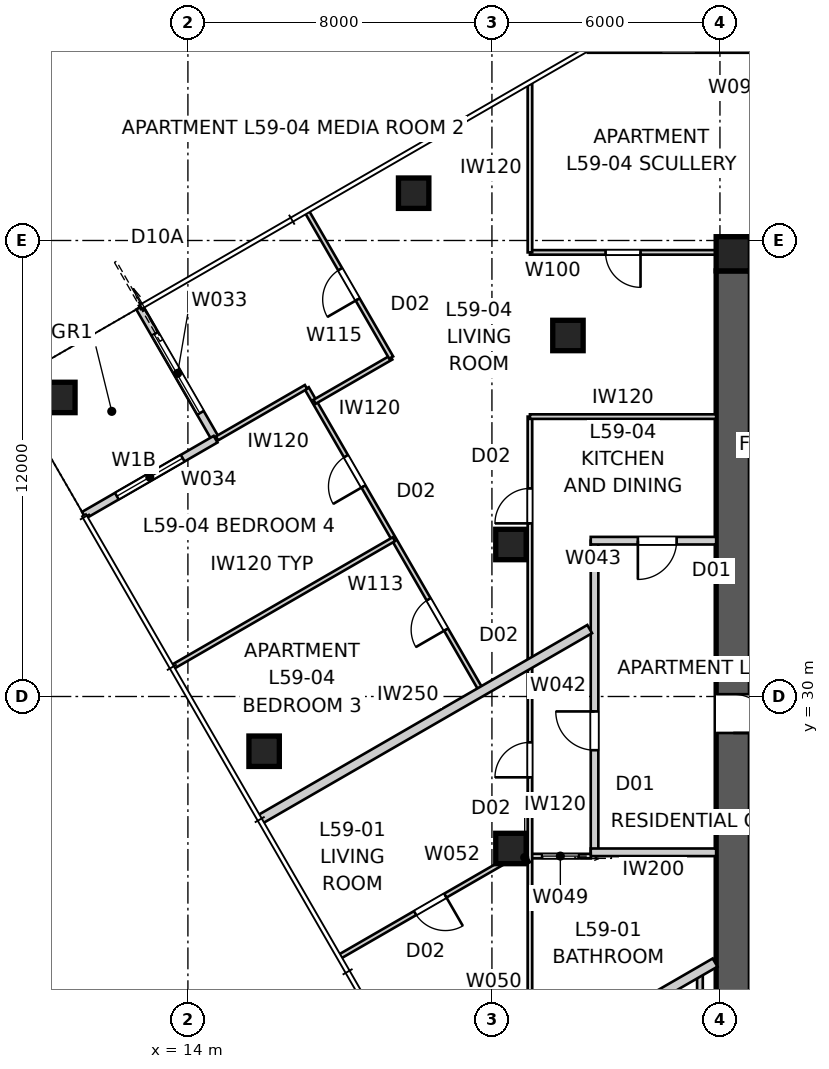
"""IFC4 building model, lengths in metres.
Left out: names, types, materials, properties, quantities, classifications, styles, units other than length and angle.
Written with IfcOpenShell. Run it as: python <this file> out.ifc"""

import sys

from ifc_helpers import new_model, si_unit, direction, frame, frame_2d, origin, origin_2d, place, context, subcontext, project, spatial, polyline, rectangle, outline, extrude, element, fill, save


model = new_model("IFC4")
c1 = context("Model", 3, precision=1e-05, world=origin(), true_north=direction((0.0, 1.0)))
c2 = subcontext(c1, "Body", "Model", "MODEL_VIEW")
j1 = project(units=[si_unit("LENGTHUNIT", "METRE"), si_unit("PLANEANGLEUNIT", "RADIAN")], contexts=[c1])
p1 = place(None, origin())
s1 = spatial("IfcSite", under=j1, at=p1, CompositionType="ELEMENT")
p2 = place(p1, origin())
s2 = spatial("IfcBuilding", under=s1, at=p2, CompositionType="ELEMENT")
p3 = place(p2, frame((0.0, 0.0, 215.0)))
s3 = spatial("IfcBuildingStorey", under=s2, at=p3, CompositionType="ELEMENT", Elevation=215.0)
p4 = place(p3, frame((28.8, 41.65, 0.0), z_axis=(0.0, 0.0, 1.0), x_axis=(1.0, 0.0, 0.0)))
e1 = element("IfcWall", 1, at=p4, inside=s3, PredefinedType="SHEAR", context=c2, shape_type="SweptSolid", body=[
    extrude(outline(polyline([(0.0, -0.45), (22.4, -0.45), (22.4, -0.025), (22.85, -0.025), (22.85, 0.025), (22.4, 0.025), (22.4, 0.45), (0.0, 0.45), (0.0, 0.025), (-0.45, 0.025), (-0.45, -0.025), (0.0, -0.025), (0.0, -0.45)])), origin(), (0.0, 0.0, 1.0), 3.4),
])
p5 = place(p3, frame((28.35, 41.2, 0.0), z_axis=(0.0, 0.0, 1.0), x_axis=(0.0, -1.0, 0.0)))
e2 = element("IfcWall", 2, at=p5, inside=s3, PredefinedType="SHEAR", context=c2, shape_type="SweptSolid", body=[
    extrude(outline(polyline([(0.0, -0.45), (22.4, -0.45), (22.4, -0.025), (22.85, -0.025), (22.85, 0.025), (22.4, 0.025), (22.4, 0.45), (0.0, 0.45), (0.0, 0.025), (-0.45, 0.025), (-0.45, -0.025), (0.0, -0.025), (0.0, -0.45)])), origin(), (0.0, 0.0, 1.0), 3.4),
])
p6 = place(p5, frame((11.14, 0.0, 0.0)))
e3 = element("IfcOpeningElement", 3, at=p6, cuts=e2, PredefinedType="OPENING", context=c2, shape_type="SweptSolid", body=[
    extrude(rectangle(XDim=1.02, YDim=2.4, at=frame_2d((0.51, 1.2))), frame((0.0, 0.46, 0.0), z_axis=(0.0, -1.0, 0.0), x_axis=(1.0, 0.0, 0.0)), (0.0, 0.0, 1.0), 0.92),
])
p7 = place(p3, frame((28.35, 41.65, 0.0), z_axis=(0.0, 0.0, 1.0), x_axis=(1.0, 0.0, 0.0)))
e4 = element("IfcColumn", 4, at=p7, inside=s3, PredefinedType="COLUMN", context=c2, shape_type="SweptSolid", body=[
    extrude(rectangle(XDim=0.9, YDim=0.9, at=origin_2d()), origin(), (0.0, 0.0, 1.0), 3.4),
])
for number, where, z_axis, x_axis in (
    (5, (19.94, 43.245, 0.0), (0.0, 0.0, 1.0), (1.0, 0.0, 0.0)),
    (6, (10.63, 37.87, 0.0), (0.0, 0.0, 1.0), (1.0, 0.0, 0.0)),
    (7, (16.005, 28.56, 0.0), (0.0, 0.0, 1.0), (1.0, 0.0, 0.0)),
    (8, (24.0, 39.5, 0.0), (0.0, 0.0, 1.0), (1.0, 0.0, 0.0)),
    (9, (22.5, 34.0, 0.0), (0.0, 0.0, 1.0), (1.0, 0.0, 0.0)),
    (10, (22.5, 26.0, 0.0), (0.0, 0.0, 1.0), (1.0, 0.0, 0.0)),
):
    element("IfcColumn", number, at=place(p3, frame(where, z_axis=z_axis, x_axis=x_axis)), inside=s3, PredefinedType="COLUMN", context=c2, shape_type="SweptSolid", body=[
        extrude(rectangle(XDim=0.8, YDim=0.8, at=origin_2d()), origin(), (0.0, 0.0, 1.0), 3.4),
    ])
p8 = place(p3, frame((12.729, 40.236, 0.0), z_axis=(0.0, 0.0, 1.0), x_axis=(0.49999894854, -0.866026010844, 0.0)))
e11 = element("IfcWall", 11, at=p8, inside=s3, PredefinedType="SOLIDWALL", context=c2, shape_type="SweptSolid", body=[
    extrude(rectangle(XDim=4.0, YDim=0.2, at=frame_2d((2.0, 0.0))), origin(), (0.0, 0.0, 1.0), 3.25),
])
p9 = place(p8, frame((0.8, 0.0, 0.0)))
e12 = element("IfcOpeningElement", 12, at=p9, cuts=e11, PredefinedType="OPENING", context=c2, shape_type="SweptSolid", body=[
    extrude(rectangle(XDim=2.4, YDim=2.1, at=frame_2d((1.2, 1.05))), frame((0.0, 0.11, 0.0), z_axis=(0.0, -1.0, 0.0), x_axis=(1.0, 0.0, 0.0)), (0.0, 0.0, 1.0), 0.22),
])
p10 = place(p3, frame((14.729, 36.771, 0.0), z_axis=(0.0, 0.0, 1.0), x_axis=(-0.866026010844, -0.49999894854, 0.0)))
e13 = element("IfcWall", 13, at=p10, inside=s3, PredefinedType="SOLIDWALL", context=c2, shape_type="SweptSolid", body=[
    extrude(rectangle(XDim=4.0, YDim=0.2, at=frame_2d((2.0, 0.0))), origin(), (0.0, 0.0, 1.0), 3.25),
])
p11 = place(p10, frame((1.0, 0.0, 0.45)))
e14 = element("IfcOpeningElement", 14, at=p11, cuts=e13, PredefinedType="OPENING", context=c2, shape_type="SweptSolid", body=[
    extrude(rectangle(XDim=2.0, YDim=1.8, at=frame_2d((1.0, 0.9))), frame((0.0, 0.11, 0.0), z_axis=(0.0, -1.0, 0.0), x_axis=(1.0, 0.0, 0.0)), (0.0, 0.0, 1.0), 0.22),
])
p12 = place(p3, frame((24.7, 25.9, 0.0), z_axis=(0.0, 0.0, 1.0), x_axis=(0.0, 1.0, 0.0)))
e15 = element("IfcWall", 15, at=p12, inside=s3, PredefinedType="PARTITIONING", context=c2, shape_type="SweptSolid", body=[
    extrude(rectangle(XDim=8.2, YDim=0.2, at=frame_2d((4.1, 0.0))), origin(), (0.0, 0.0, 1.0), 3.25),
])
p13 = place(p12, frame((2.687, 0.0, 0.0)))
e16 = element("IfcOpeningElement", 16, at=p13, cuts=e15, PredefinedType="OPENING", context=c2, shape_type="SweptSolid", body=[
    extrude(rectangle(XDim=1.02, YDim=2.34, at=frame_2d((0.51, 1.17))), frame((0.0, 0.11, 0.0), z_axis=(0.0, -1.0, 0.0), x_axis=(1.0, 0.0, 0.0)), (0.0, 0.0, 1.0), 0.22),
])
p14 = place(p3, frame((27.9, 34.1, 0.0), z_axis=(0.0, 0.0, 1.0), x_axis=(-1.0, 0.0, 0.0)))
e17 = element("IfcWall", 17, at=p14, inside=s3, PredefinedType="PARTITIONING", context=c2, shape_type="SweptSolid", body=[
    extrude(rectangle(XDim=3.3, YDim=0.2, at=frame_2d((1.65, 0.0))), origin(), (0.0, 0.0, 1.0), 3.25),
])
p15 = place(p14, frame((1.04, 0.0, 0.0)))
e18 = element("IfcOpeningElement", 18, at=p15, cuts=e17, PredefinedType="OPENING", context=c2, shape_type="SweptSolid", body=[
    extrude(rectangle(XDim=1.02, YDim=2.34, at=frame_2d((0.51, 1.17))), frame((0.0, 0.11, 0.0), z_axis=(0.0, -1.0, 0.0), x_axis=(1.0, 0.0, 0.0)), (0.0, 0.0, 1.0), 0.22),
])
p16 = place(p3, frame((27.9, 25.9, 0.0), z_axis=(0.0, 0.0, 1.0), x_axis=(-1.0, 0.0, 0.0)))
e19 = element("IfcWall", 19, at=p16, inside=s3, PredefinedType="PARTITIONING", context=c2, shape_type="SweptSolid", body=[
    extrude(rectangle(XDim=3.3, YDim=0.2, at=frame_2d((1.65, 0.0))), origin(), (0.0, 0.0, 1.0), 3.25),
])
p17 = place(p3, frame((20.514, 18.75, 0.0), z_axis=(0.0, 0.0, 1.0), x_axis=(0.866020489494, 0.500008511703, 0.0)))
e20 = element("IfcWall", 20, at=p17, inside=s3, PredefinedType="PARTITIONING", context=c2, shape_type="SweptSolid", body=[
    extrude(rectangle(XDim=8.496, YDim=0.25, at=frame_2d((4.248, 0.0))), origin(), (0.0, 0.0, 1.0), 3.25),
])
p18 = place(p3, frame((15.889, 26.761, 0.0), z_axis=(0.0, 0.0, 1.0), x_axis=(0.866024190901, 0.50000210077, 0.0)))
e21 = element("IfcWall", 21, at=p18, inside=s3, PredefinedType="PARTITIONING", context=c2, shape_type="SweptSolid", body=[
    extrude(rectangle(XDim=10.026, YDim=0.25, at=frame_2d((5.013, 0.0))), origin(), (0.0, 0.0, 1.0), 3.25),
])
p19 = place(p3, frame((24.6, 25.8, 0.0), z_axis=(0.0, 0.0, 1.0), x_axis=(-1.0, 0.0, 0.0)))
e22 = element("IfcWall", 22, at=p19, inside=s3, PredefinedType="PARTITIONING", context=c2, shape_type="SweptSolid", body=[
    extrude(rectangle(XDim=1.6, YDim=0.12, at=frame_2d((0.8, 0.0))), origin(), (0.0, 0.0, 1.0), 3.25),
])
p20 = place(p19, frame((0.32, 0.0, 0.0)))
e23 = element("IfcOpeningElement", 23, at=p20, cuts=e22, PredefinedType="OPENING", context=c2, shape_type="SweptSolid", body=[
    extrude(rectangle(XDim=0.96, YDim=2.1, at=frame_2d((0.48, 1.05))), frame((0.0, 0.07, 0.0), z_axis=(0.0, -1.0, 0.0), x_axis=(1.0, 0.0, 0.0)), (0.0, 0.0, 1.0), 0.14),
])
p21 = place(p3, frame((23.0, 20.185, 0.0), z_axis=(0.0, 0.0, 1.0), x_axis=(0.0, 1.0, 0.0)))
e24 = element("IfcWall", 24, at=p21, inside=s3, PredefinedType="PARTITIONING", context=c2, shape_type="SweptSolid", body=[
    extrude(rectangle(XDim=17.18, YDim=0.12, at=frame_2d((8.59, 0.0))), origin(), (0.0, 0.0, 1.0), 2.55),
])
p22 = place(p21, frame((7.688, 0.0, 0.0)))
e25 = element("IfcOpeningElement", 25, at=p22, cuts=e24, PredefinedType="OPENING", context=c2, shape_type="SweptSolid", body=[
    extrude(rectangle(XDim=0.92, YDim=2.34, at=frame_2d((0.46, 1.17))), frame((0.0, 0.07, 0.0), z_axis=(0.0, -1.0, 0.0), x_axis=(1.0, 0.0, 0.0)), (0.0, 0.0, 1.0), 0.14),
])
p23 = place(p21, frame((14.371, 0.0, 0.0)))
e26 = element("IfcOpeningElement", 26, at=p23, cuts=e24, PredefinedType="OPENING", context=c2, shape_type="SweptSolid", body=[
    extrude(rectangle(XDim=0.92, YDim=2.34, at=frame_2d((0.46, 1.17))), frame((0.0, 0.07, 0.0), z_axis=(0.0, -1.0, 0.0), x_axis=(1.0, 0.0, 0.0)), (0.0, 0.0, 1.0), 0.14),
])
p24 = place(p3, frame((22.95, 25.612, 0.0), z_axis=(0.0, 0.0, 1.0), x_axis=(-0.49996389635, 0.866046247233, 0.0)))
e27 = element("IfcWall", 27, at=p24, inside=s3, PredefinedType="PARTITIONING", context=c2, shape_type="SweptSolid", body=[
    extrude(rectangle(XDim=0.35, YDim=0.12, at=frame_2d((0.175, 0.0))), origin(), (0.0, 0.0, 1.0), 3.25),
])
p25 = place(p3, frame((22.775, 25.915, 0.0), z_axis=(0.0, 0.0, 1.0), x_axis=(-0.866019274569, -0.500010615962, 0.0)))
e28 = element("IfcWall", 28, at=p25, inside=s3, PredefinedType="PARTITIONING", context=c2, shape_type="SweptSolid", body=[
    extrude(rectangle(XDim=5.5, YDim=0.12, at=frame_2d((2.75, 0.0))), origin(), (0.0, 0.0, 1.0), 3.25),
])
p26 = place(p25, frame((2.31, 0.0, 0.0)))
e29 = element("IfcOpeningElement", 29, at=p26, cuts=e28, PredefinedType="OPENING", context=c2, shape_type="SweptSolid", body=[
    extrude(rectangle(XDim=0.92, YDim=2.34, at=frame_2d((0.46, 1.17))), frame((0.0, 0.07, 0.0), z_axis=(0.0, -1.0, 0.0), x_axis=(1.0, 0.0, 0.0)), (0.0, 0.0, 1.0), 0.14),
])
p27 = place(p3, frame((27.473, 17.282, 0.0), z_axis=(0.0, 0.0, 1.0), x_axis=(0.0, 1.0, 0.0)))
e30 = element("IfcWall", 30, at=p27, inside=s3, PredefinedType="SOLIDWALL", context=c2, shape_type="SweptSolid", body=[
    extrude(rectangle(XDim=5.485, YDim=0.15, at=frame_2d((2.743, 0.0))), origin(), (0.0, 0.0, 1.0), 3.25),
])
p28 = place(p3, frame((23.0, 37.365, 0.0), z_axis=(0.0, 0.0, 1.0), x_axis=(1.0, 0.0, 0.0)))
e31 = element("IfcWall", 31, at=p28, inside=s3, PredefinedType="PARTITIONING", context=c2, shape_type="SweptSolid", body=[
    extrude(rectangle(XDim=4.9, YDim=0.12, at=frame_2d((2.45, 0.0))), origin(), (0.0, 0.0, 1.0), 3.25),
])
p29 = place(p3, frame((27.9, 41.687, 0.0), z_axis=(0.0, 0.0, 1.0), x_axis=(-1.0, 0.0, 0.0)))
e32 = element("IfcWall", 32, at=p29, inside=s3, PredefinedType="PARTITIONING", context=c2, shape_type="SweptSolid", body=[
    extrude(rectangle(XDim=4.9, YDim=0.12, at=frame_2d((2.45, 0.0))), origin(), (0.0, 0.0, 1.0), 3.25),
])
p30 = place(p29, frame((1.99, 0.0, 0.0)))
e33 = element("IfcOpeningElement", 33, at=p30, cuts=e32, PredefinedType="OPENING", context=c2, shape_type="SweptSolid", body=[
    extrude(rectangle(XDim=0.92, YDim=2.1, at=frame_2d((0.46, 1.05))), frame((0.0, 0.07, 0.0), z_axis=(0.0, -1.0, 0.0), x_axis=(1.0, 0.0, 0.0)), (0.0, 0.0, 1.0), 0.14),
])
p31 = place(p3, frame((23.0, 41.687, 0.0), z_axis=(0.0, 0.0, 1.0), x_axis=(0.0, 1.0, 0.0)))
e34 = element("IfcWall", 34, at=p31, inside=s3, PredefinedType="PARTITIONING", context=c2, shape_type="SweptSolid", body=[
    extrude(rectangle(XDim=4.433, YDim=0.12, at=frame_2d((2.216, 0.0))), origin(), (0.0, 0.0, 1.0), 3.25),
])
p32 = place(p3, frame((24.525, 47.0, 0.0), z_axis=(0.0, 0.0, 1.0), x_axis=(1.0, 0.0, 0.0)))
e35 = element("IfcWall", 35, at=p32, inside=s3, PredefinedType="PARTITIONING", context=c2, shape_type="SweptSolid", body=[
    extrude(rectangle(XDim=22.087, YDim=0.12, at=frame_2d((11.044, 0.0))), origin(), (0.0, 0.0, 1.0), 2.55),
])
p33 = place(p32, frame((1.928, 0.0, 0.0)))
e36 = element("IfcOpeningElement", 36, at=p33, cuts=e35, PredefinedType="OPENING", context=c2, shape_type="SweptSolid", body=[
    extrude(rectangle(XDim=0.92, YDim=2.34, at=frame_2d((0.46, 1.17))), frame((0.0, 0.07, 0.0), z_axis=(0.0, -1.0, 0.0), x_axis=(1.0, 0.0, 0.0)), (0.0, 0.0, 1.0), 0.14),
])
p34 = place(p32, frame((17.73, 0.0, 0.0)))
e37 = element("IfcOpeningElement", 37, at=p34, cuts=e35, PredefinedType="OPENING", context=c2, shape_type="SweptSolid", body=[
    extrude(rectangle(XDim=0.96, YDim=2.1, at=frame_2d((0.48, 1.05))), frame((0.0, 0.07, 0.0), z_axis=(0.0, -1.0, 0.0), x_axis=(1.0, 0.0, 0.0)), (0.0, 0.0, 1.0), 0.14),
])
p35 = place(p3, frame((21.733, 30.134, 0.0), z_axis=(0.0, 0.0, 1.0), x_axis=(-0.500019218905, 0.86601430746, 0.0)))
e38 = element("IfcWall", 38, at=p35, inside=s3, PredefinedType="PARTITIONING", context=c2, shape_type="SweptSolid", body=[
    extrude(rectangle(XDim=9.21, YDim=0.12, at=frame_2d((4.605, 0.0))), origin(), (0.0, 0.0, 1.0), 3.25),
])
p36 = place(p35, frame((1.877, 0.0, 0.0)))
e39 = element("IfcOpeningElement", 39, at=p36, cuts=e38, PredefinedType="OPENING", context=c2, shape_type="SweptSolid", body=[
    extrude(rectangle(XDim=0.92, YDim=2.34, at=frame_2d((0.46, 1.17))), frame((0.0, 0.07, 0.0), z_axis=(0.0, -1.0, 0.0), x_axis=(1.0, 0.0, 0.0)), (0.0, 0.0, 1.0), 0.14),
])
p37 = place(p35, frame((6.228, 0.0, 0.0)))
e40 = element("IfcOpeningElement", 40, at=p37, cuts=e38, PredefinedType="OPENING", context=c2, shape_type="SweptSolid", body=[
    extrude(rectangle(XDim=0.92, YDim=2.34, at=frame_2d((0.46, 1.17))), frame((0.0, 0.07, 0.0), z_axis=(0.0, -1.0, 0.0), x_axis=(1.0, 0.0, 0.0)), (0.0, 0.0, 1.0), 0.14),
])
p38 = place(p3, frame((17.333, 37.755, 0.0), z_axis=(0.0, 0.0, 1.0), x_axis=(0.866059848015, 0.499940336097, 0.0)))
e41 = element("IfcWall", 41, at=p38, inside=s3, PredefinedType="PARTITIONING", context=c2, shape_type="SweptSolid", body=[
    extrude(rectangle(XDim=2.328, YDim=0.12, at=frame_2d((1.164, 0.0))), origin(), (0.0, 0.0, 1.0), 3.25),
])
p39 = place(p3, frame((19.349, 38.919, 0.0), z_axis=(0.0, 0.0, 1.0), x_axis=(-0.499997192861, 0.866027024481, 0.0)))
e42 = element("IfcWall", 42, at=p39, inside=s3, PredefinedType="PARTITIONING", context=c2, shape_type="SweptSolid", body=[
    extrude(rectangle(XDim=4.41, YDim=0.12, at=frame_2d((2.205, 0.0))), origin(), (0.0, 0.0, 1.0), 3.25),
])
p40 = place(p39, frame((1.765, 0.0, 0.0)))
e43 = element("IfcOpeningElement", 43, at=p40, cuts=e42, PredefinedType="OPENING", context=c2, shape_type="SweptSolid", body=[
    extrude(rectangle(XDim=0.92, YDim=2.34, at=frame_2d((0.46, 1.17))), frame((0.0, 0.07, 0.0), z_axis=(0.0, -1.0, 0.0), x_axis=(1.0, 0.0, 0.0)), (0.0, 0.0, 1.0), 0.14),
])
p41 = place(p3, frame((13.612, 30.786, 0.0), z_axis=(0.0, 0.0, 1.0), x_axis=(0.866030409726, 0.499991329354, 0.0)))
e44 = element("IfcWall", 44, at=p41, inside=s3, PredefinedType="PARTITIONING", context=c2, shape_type="SweptSolid", body=[
    extrude(rectangle(XDim=6.707, YDim=0.12, at=frame_2d((3.354, 0.0))), origin(), (0.0, 0.0, 1.0), 3.25),
])
p42 = place(p3, frame((14.763, 36.792, 0.0), z_axis=(0.0, 0.0, 1.0), x_axis=(0.86601436245, 0.500019123664, 0.0)))
e45 = element("IfcWall", 45, at=p42, inside=s3, PredefinedType="PARTITIONING", context=c2, shape_type="SweptSolid", body=[
    extrude(rectangle(XDim=2.707, YDim=0.12, at=frame_2d((1.354, 0.0))), origin(), (0.0, 0.0, 1.0), 3.25),
])
p43 = place(p3, frame((27.9, 41.687, 0.0), z_axis=(0.0, 0.0, 1.0), x_axis=(0.999162409553, -0.040920402453, 0.0)))
e46 = element("IfcWall", 46, at=p43, inside=s3, PredefinedType="PARTITIONING", context=c2, shape_type="SweptSolid", body=[
    extrude(rectangle(XDim=0.901, YDim=0.12, at=frame_2d((0.45, 0.0))), origin(), (0.0, 0.0, 1.0), 3.25),
])
p44 = place(p9, origin())
e47 = element("IfcDoor", 47, at=p44, inside=s3, OperationType="SLIDING_TO_LEFT", PredefinedType="DOOR", context=c2, shape_type="SweptSolid", body=[
    extrude(rectangle(XDim=2.4, YDim=2.1, at=frame_2d((1.2, 1.05))), frame((0.0, 0.025, 0.0), z_axis=(0.0, -1.0, 0.0), x_axis=(1.0, 0.0, 0.0)), (0.0, 0.0, 1.0), 0.05),
])
fill(e12, e47)
p45 = place(p11, origin())
e48 = element("IfcWindow", 48, at=p45, inside=s3, PartitioningType="SINGLE_PANEL", PredefinedType="WINDOW", context=c2, shape_type="SweptSolid", body=[
    extrude(rectangle(XDim=2.0, YDim=1.8, at=frame_2d((1.0, 0.9))), frame((0.0, 0.03, 0.0), z_axis=(0.0, -1.0, 0.0), x_axis=(1.0, 0.0, 0.0)), (0.0, 0.0, 1.0), 0.06),
])
fill(e14, e48)
p46 = place(p13, origin())
e49 = element("IfcDoor", 49, at=p46, inside=s3, OperationType="SINGLE_SWING_RIGHT", PredefinedType="DOOR", context=c2, shape_type="SweptSolid", body=[
    extrude(rectangle(XDim=1.02, YDim=2.34, at=frame_2d((0.51, 1.17))), frame((0.0, 0.025, 0.0), z_axis=(0.0, -1.0, 0.0), x_axis=(1.0, 0.0, 0.0)), (0.0, 0.0, 1.0), 0.05),
])
fill(e16, e49)
p47 = place(p15, origin())
e50 = element("IfcDoor", 50, at=p47, inside=s3, OperationType="SINGLE_SWING_RIGHT", PredefinedType="DOOR", context=c2, shape_type="SweptSolid", body=[
    extrude(rectangle(XDim=1.02, YDim=2.34, at=frame_2d((0.51, 1.17))), frame((0.0, 0.025, 0.0), z_axis=(0.0, -1.0, 0.0), x_axis=(1.0, 0.0, 0.0)), (0.0, 0.0, 1.0), 0.05),
])
fill(e18, e50)
p48 = place(p22, origin())
e51 = element("IfcDoor", 51, at=p48, inside=s3, OperationType="SINGLE_SWING_LEFT", PredefinedType="DOOR", context=c2, shape_type="SweptSolid", body=[
    extrude(rectangle(XDim=0.92, YDim=2.34, at=frame_2d((0.46, 1.17))), frame((0.0, 0.025, 0.0), z_axis=(0.0, -1.0, 0.0), x_axis=(1.0, 0.0, 0.0)), (0.0, 0.0, 1.0), 0.05),
])
fill(e25, e51)
p49 = place(p20, origin())
e52 = element("IfcDoor", 52, at=p49, inside=s3, OperationType="SLIDING_TO_LEFT", PredefinedType="DOOR", context=c2, shape_type="SweptSolid", body=[
    extrude(rectangle(XDim=0.96, YDim=2.1, at=frame_2d((0.48, 1.05))), frame((0.0, 0.025, 0.0), z_axis=(0.0, -1.0, 0.0), x_axis=(1.0, 0.0, 0.0)), (0.0, 0.0, 1.0), 0.05),
])
fill(e23, e52)
p50 = place(p23, origin())
e53 = element("IfcDoor", 53, at=p50, inside=s3, OperationType="SINGLE_SWING_LEFT", PredefinedType="DOOR", context=c2, shape_type="SweptSolid", body=[
    extrude(rectangle(XDim=0.92, YDim=2.34, at=frame_2d((0.46, 1.17))), frame((0.0, 0.025, 0.0), z_axis=(0.0, -1.0, 0.0), x_axis=(1.0, 0.0, 0.0)), (0.0, 0.0, 1.0), 0.05),
])
fill(e26, e53)
p51 = place(p26, origin())
e54 = element("IfcDoor", 54, at=p51, inside=s3, OperationType="SINGLE_SWING_LEFT", PredefinedType="DOOR", context=c2, shape_type="SweptSolid", body=[
    extrude(rectangle(XDim=0.92, YDim=2.34, at=frame_2d((0.46, 1.17))), frame((0.0, 0.025, 0.0), z_axis=(0.0, -1.0, 0.0), x_axis=(1.0, 0.0, 0.0)), (0.0, 0.0, 1.0), 0.05),
])
fill(e29, e54)
p52 = place(p30, origin())
e55 = element("IfcDoor", 55, at=p52, inside=s3, OperationType="SINGLE_SWING_LEFT", PredefinedType="DOOR", context=c2, shape_type="SweptSolid", body=[
    extrude(rectangle(XDim=0.92, YDim=2.1, at=frame_2d((0.46, 1.05))), frame((0.0, 0.025, 0.0), z_axis=(0.0, -1.0, 0.0), x_axis=(1.0, 0.0, 0.0)), (0.0, 0.0, 1.0), 0.05),
])
fill(e33, e55)
p53 = place(p36, origin())
e56 = element("IfcDoor", 56, at=p53, inside=s3, OperationType="SINGLE_SWING_LEFT", PredefinedType="DOOR", context=c2, shape_type="SweptSolid", body=[
    extrude(rectangle(XDim=0.92, YDim=2.34, at=frame_2d((0.46, 1.17))), frame((0.0, 0.025, 0.0), z_axis=(0.0, -1.0, 0.0), x_axis=(1.0, 0.0, 0.0)), (0.0, 0.0, 1.0), 0.05),
])
fill(e39, e56)
p54 = place(p40, origin())
e57 = element("IfcDoor", 57, at=p54, inside=s3, OperationType="SINGLE_SWING_LEFT", PredefinedType="DOOR", context=c2, shape_type="SweptSolid", body=[
    extrude(rectangle(XDim=0.92, YDim=2.34, at=frame_2d((0.46, 1.17))), frame((0.0, 0.025, 0.0), z_axis=(0.0, -1.0, 0.0), x_axis=(1.0, 0.0, 0.0)), (0.0, 0.0, 1.0), 0.05),
])
fill(e43, e57)
p55 = place(p37, origin())
e58 = element("IfcDoor", 58, at=p55, inside=s3, OperationType="SINGLE_SWING_LEFT", PredefinedType="DOOR", context=c2, shape_type="SweptSolid", body=[
    extrude(rectangle(XDim=0.92, YDim=2.34, at=frame_2d((0.46, 1.17))), frame((0.0, 0.025, 0.0), z_axis=(0.0, -1.0, 0.0), x_axis=(1.0, 0.0, 0.0)), (0.0, 0.0, 1.0), 0.05),
])
fill(e40, e58)
p56 = place(p6, origin())
e59 = element("IfcDoor", 59, at=p56, inside=s3, OperationType="SINGLE_SWING_RIGHT", PredefinedType="DOOR", context=c2, shape_type="SweptSolid", body=[
    extrude(rectangle(XDim=1.02, YDim=2.4, at=frame_2d((0.51, 1.2))), frame((0.0, 0.025, 0.0), z_axis=(0.0, -1.0, 0.0), x_axis=(1.0, 0.0, 0.0)), (0.0, 0.0, 1.0), 0.05),
])
fill(e3, e59)
save(model, sys.argv[1])
